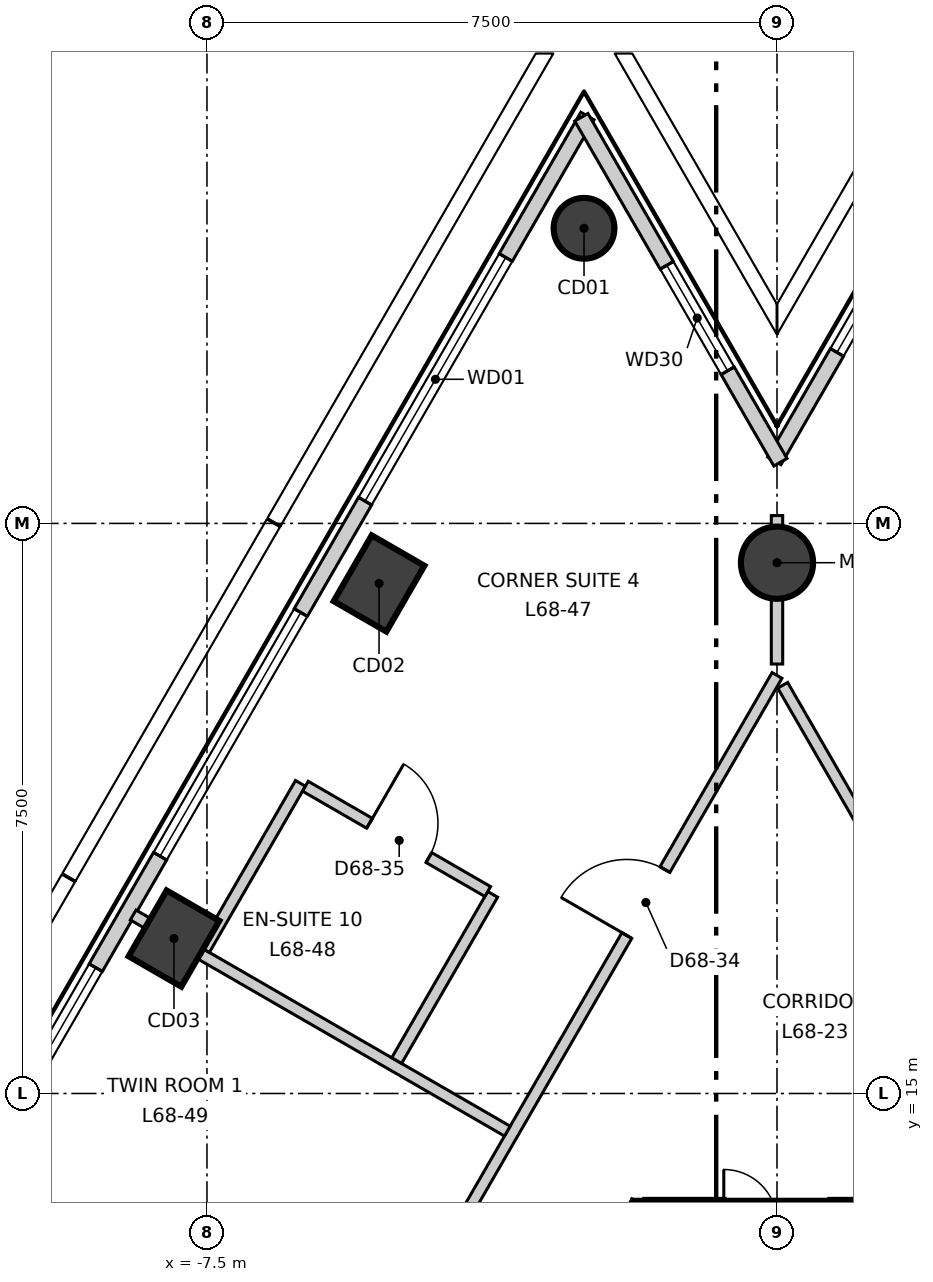
"""IFC4 building model, lengths in metres.
Left out: names, types, materials, properties, quantities, classifications, styles, units other than length and angle.
Written with IfcOpenShell. Run it as: python <this file> out.ifc"""

import sys

from ifc_helpers import new_model, si_unit, direction, frame, frame_2d, origin, origin_2d, place, context, subcontext, project, spatial, polyline, rectangle, circle, outline, extrude, element, fill, save


model = new_model("IFC4")
c1 = context("Model", 3, precision=1e-05, world=origin(), true_north=direction((0.0, 1.0)))
c2 = subcontext(c1, "Body", "Model", "MODEL_VIEW")
j1 = project(units=[si_unit("LENGTHUNIT", "METRE"), si_unit("PLANEANGLEUNIT", "RADIAN")], contexts=[c1])
p1 = place(None, origin())
s1 = spatial("IfcSite", under=j1, at=p1, CompositionType="ELEMENT")
p2 = place(p1, origin())
s2 = spatial("IfcBuilding", under=s1, at=p2, CompositionType="ELEMENT")
p3 = place(p2, frame((0.0, 0.0, 289.9)))
s3 = spatial("IfcBuildingStorey", under=s2, at=p3, CompositionType="ELEMENT", Elevation=289.9)
p4 = place(p3, frame((1.732, 13.3, -0.3), z_axis=(0.0, 0.0, 1.0), x_axis=(-1.0, 0.0, 0.0)))
e1 = element("IfcWall", 1, at=p4, inside=s3, PredefinedType="SHEAR", context=c2, shape_type="SweptSolid", body=[
    extrude(outline(polyline([(-0.173, -0.3), (1.732, -0.3), (3.637, -0.3), (3.291, 0.3), (1.732, 0.3), (0.173, 0.3), (-0.173, -0.3)])), origin(), (0.0, 0.0, 1.0), 3.6),
])
p5 = place(p4, frame((1.032, 0.0, 0.3)))
e2 = element("IfcOpeningElement", 2, at=p5, cuts=e1, PredefinedType="OPENING", context=c2, shape_type="SweptSolid", body=[
    extrude(rectangle(XDim=1.4, YDim=2.1, at=frame_2d((0.7, 1.05))), frame((0.0, 0.31, 0.0), z_axis=(0.0, -1.0, 0.0), x_axis=(1.0, 0.0, 0.0)), (0.0, 0.0, 1.0), 0.62),
])
p6 = place(p3, frame((-1.732, 13.3, -0.3), z_axis=(0.0, 0.0, 1.0), x_axis=(-0.500000539815, -0.866025092122, 0.0)))
e3 = element("IfcWall", 3, at=p6, inside=s3, PredefinedType="SHEAR", context=c2, shape_type="SweptSolid", body=[
    extrude(outline(polyline([(-0.173, -0.3), (1.795, -0.3), (3.763, -0.3), (5.732, -0.3), (7.7, -0.3), (9.668, -0.301), (11.637, -0.301), (13.605, -0.301), (15.573, -0.301), (17.542, -0.301), (19.51, -0.301), (21.478, -0.301), (21.131, 0.3), (19.226, 0.3), (17.321, 0.3), (15.415, 0.3), (13.51, 0.3), (11.605, 0.3), (9.699, 0.3), (7.794, 0.3), (5.889, 0.3), (3.984, 0.3), (2.078, 0.3), (0.173, 0.3), (-0.173, -0.3)])), origin(), (0.0, 0.0, 1.0), 3.6),
])
p7 = place(p6, frame((10.102, 0.0, 0.3)))
e4 = element("IfcOpeningElement", 4, at=p7, cuts=e3, PredefinedType="OPENING", context=c2, shape_type="SweptSolid", body=[
    extrude(rectangle(XDim=1.1, YDim=2.1, at=frame_2d((0.55, 1.05))), frame((0.0, 0.31, 0.0), z_axis=(0.0, -1.0, 0.0), x_axis=(1.0, 0.0, 0.0)), (0.0, 0.0, 1.0), 0.621),
])
p8 = place(p6, frame((16.328, 0.0, 0.3)))
e5 = element("IfcOpeningElement", 5, at=p8, cuts=e3, PredefinedType="OPENING", context=c2, shape_type="SweptSolid", body=[
    extrude(rectangle(XDim=1.0, YDim=2.1, at=frame_2d((0.5, 1.05))), frame((0.0, 0.31, 0.0), z_axis=(0.0, -1.0, 0.0), x_axis=(1.0, 0.0, 0.0)), (0.0, 0.0, 1.0), 0.621),
])
p9 = place(p6, frame((4.777, 0.0, 0.3)))
e6 = element("IfcOpeningElement", 6, at=p9, cuts=e3, PredefinedType="OPENING", context=c2, shape_type="SweptSolid", body=[
    extrude(rectangle(XDim=0.9, YDim=2.1, at=frame_2d((0.45, 1.05))), frame((0.0, 0.31, 0.0), z_axis=(0.0, -1.0, 0.0), x_axis=(1.0, 0.0, 0.0)), (0.0, 0.0, 1.0), 0.621),
])
p10 = place(p3, frame((-2.539, 26.382, -0.3), z_axis=(0.0, 0.0, 1.0), x_axis=(0.5, 0.866025403784, 0.0)))
e7 = element("IfcColumn", 7, at=p10, inside=s3, PredefinedType="COLUMN", context=c2, shape_type="SweptSolid", body=[
    extrude(circle(Radius=0.4, at=origin_2d()), origin(), (0.0, 0.0, 1.0), 3.6),
])
for number, where, z_axis, x_axis in (
    (8, (-5.236, 21.71, -0.3), (0.0, 0.0, 1.0), (0.5, 0.866, 0.0)),
    (9, (-7.934, 17.038, -0.3), (0.0, 0.0, 1.0), (0.5, 0.866, 0.0)),
):
    element("IfcColumn", number, at=place(p3, frame(where, z_axis=z_axis, x_axis=x_axis)), inside=s3, PredefinedType="COLUMN", context=c2, shape_type="SweptSolid", body=[
        extrude(rectangle(XDim=1.0, YDim=0.8, at=origin_2d()), origin(), (0.0, 0.0, 1.0), 3.6),
    ])
p11 = place(p3, frame((0.0, 21.983, -0.3), z_axis=(0.0, 0.0, 1.0), x_axis=(1.0, 0.0, 0.0)))
e10 = element("IfcColumn", 10, at=p11, inside=s3, PredefinedType="COLUMN", context=c2, shape_type="SweptSolid", body=[
    extrude(circle(Radius=0.475, at=origin_2d()), origin(), (0.0, 0.0, 1.0), 3.6),
])
p12 = place(p3, frame((-2.494, 27.86, 0.0), z_axis=(0.0, 0.0, 1.0), x_axis=(-0.500008134474, -0.866020707292, 0.0)))
e11 = element("IfcWall", 11, at=p12, inside=s3, PredefinedType="ELEMENTEDWALL", context=c2, shape_type="SweptSolid", body=[
    extrude(rectangle(XDim=45.741, YDim=0.2, at=frame_2d((22.871, 0.0))), origin(), (0.0, 0.0, 1.0), 3.3),
])
p13 = place(p12, frame((2.15, 0.0, 0.9)))
e12 = element("IfcOpeningElement", 12, at=p13, cuts=e11, PredefinedType="OPENING", context=c2, shape_type="SweptSolid", body=[
    extrude(rectangle(XDim=3.7, YDim=2.2, at=frame_2d((1.85, 1.1))), frame((0.0, 0.11, 0.0), z_axis=(0.0, -1.0, 0.0), x_axis=(1.0, 0.0, 0.0)), (0.0, 0.0, 1.0), 0.22),
])
p14 = place(p12, frame((7.544, 0.0, 0.9)))
e13 = element("IfcOpeningElement", 13, at=p14, cuts=e11, PredefinedType="OPENING", context=c2, shape_type="SweptSolid", body=[
    extrude(rectangle(XDim=3.7, YDim=2.2, at=frame_2d((1.85, 1.1))), frame((0.0, 0.11, 0.0), z_axis=(0.0, -1.0, 0.0), x_axis=(1.0, 0.0, 0.0)), (0.0, 0.0, 1.0), 0.22),
])
p15 = place(p12, frame((12.939, 0.0, 0.9)))
e14 = element("IfcOpeningElement", 14, at=p15, cuts=e11, PredefinedType="OPENING", context=c2, shape_type="SweptSolid", body=[
    extrude(rectangle(XDim=3.7, YDim=2.2, at=frame_2d((1.85, 1.1))), frame((0.0, 0.11, 0.0), z_axis=(0.0, -1.0, 0.0), x_axis=(1.0, 0.0, 0.0)), (0.0, 0.0, 1.0), 0.22),
])
p16 = place(p12, frame((18.333, 0.0, 0.9)))
e15 = element("IfcOpeningElement", 15, at=p16, cuts=e11, PredefinedType="OPENING", context=c2, shape_type="SweptSolid", body=[
    extrude(rectangle(XDim=3.7, YDim=2.2, at=frame_2d((1.85, 1.1))), frame((0.0, 0.11, 0.0), z_axis=(0.0, -1.0, 0.0), x_axis=(1.0, 0.0, 0.0)), (0.0, 0.0, 1.0), 0.22),
])
p17 = place(p12, frame((23.728, 0.0, 0.9)))
e16 = element("IfcOpeningElement", 16, at=p17, cuts=e11, PredefinedType="OPENING", context=c2, shape_type="SweptSolid", body=[
    extrude(rectangle(XDim=3.7, YDim=2.2, at=frame_2d((1.85, 1.1))), frame((0.0, 0.11, 0.0), z_axis=(0.0, -1.0, 0.0), x_axis=(1.0, 0.0, 0.0)), (0.0, 0.0, 1.0), 0.22),
])
p18 = place(p12, frame((29.122, 0.0, 0.9)))
e17 = element("IfcOpeningElement", 17, at=p18, cuts=e11, PredefinedType="OPENING", context=c2, shape_type="SweptSolid", body=[
    extrude(rectangle(XDim=3.7, YDim=2.2, at=frame_2d((1.85, 1.1))), frame((0.0, 0.11, 0.0), z_axis=(0.0, -1.0, 0.0), x_axis=(1.0, 0.0, 0.0)), (0.0, 0.0, 1.0), 0.22),
])
p19 = place(p12, frame((34.517, 0.0, 0.9)))
e18 = element("IfcOpeningElement", 18, at=p19, cuts=e11, PredefinedType="OPENING", context=c2, shape_type="SweptSolid", body=[
    extrude(rectangle(XDim=3.7, YDim=2.2, at=frame_2d((1.85, 1.1))), frame((0.0, 0.11, 0.0), z_axis=(0.0, -1.0, 0.0), x_axis=(1.0, 0.0, 0.0)), (0.0, 0.0, 1.0), 0.22),
])
p20 = place(p12, frame((39.911, 0.0, 0.9)))
e19 = element("IfcOpeningElement", 19, at=p20, cuts=e11, PredefinedType="OPENING", context=c2, shape_type="SweptSolid", body=[
    extrude(rectangle(XDim=3.7, YDim=2.2, at=frame_2d((1.85, 1.1))), frame((0.0, 0.11, 0.0), z_axis=(0.0, -1.0, 0.0), x_axis=(1.0, 0.0, 0.0)), (0.0, 0.0, 1.0), 0.22),
])
p21 = place(p3, frame((2.584, 27.86, 0.0), z_axis=(0.0, 0.0, 1.0), x_axis=(-0.499832707108, -0.866121968839, 0.0)))
e20 = element("IfcWall", 20, at=p21, inside=s3, PredefinedType="ELEMENTEDWALL", context=c2, shape_type="SweptSolid", body=[
    extrude(rectangle(XDim=5.24, YDim=0.2, at=frame_2d((2.62, 0.0))), origin(), (0.0, 0.0, 1.0), 3.3),
])
p22 = place(p21, frame((1.99, 0.0, 0.9)))
e21 = element("IfcOpeningElement", 21, at=p22, cuts=e20, PredefinedType="OPENING", context=c2, shape_type="SweptSolid", body=[
    extrude(rectangle(XDim=1.6, YDim=2.2, at=frame_2d((0.8, 1.1))), frame((0.0, 0.11, 0.0), z_axis=(0.0, -1.0, 0.0), x_axis=(1.0, 0.0, 0.0)), (0.0, 0.0, 1.0), 0.22),
])
p23 = place(p3, frame((0.045, 23.305, 0.0), z_axis=(0.0, 0.0, 1.0), x_axis=(-0.499832707108, 0.866121968839, 0.0)))
e22 = element("IfcWall", 22, at=p23, inside=s3, PredefinedType="ELEMENTEDWALL", context=c2, shape_type="SweptSolid", body=[
    extrude(rectangle(XDim=5.24, YDim=0.2, at=frame_2d((2.62, 0.0))), origin(), (0.0, 0.0, 1.0), 3.3),
])
p24 = place(p23, frame((1.39, 0.0, 0.9)))
e23 = element("IfcOpeningElement", 23, at=p24, cuts=e22, PredefinedType="OPENING", context=c2, shape_type="SweptSolid", body=[
    extrude(rectangle(XDim=1.6, YDim=2.2, at=frame_2d((0.8, 1.1))), frame((0.0, 0.11, 0.0), z_axis=(0.0, -1.0, 0.0), x_axis=(1.0, 0.0, 0.0)), (0.0, 0.0, 1.0), 0.22),
])
p25 = place(p3, frame((-17.679, -10.12, 0.0), z_axis=(0.0, 0.0, 1.0), x_axis=(0.500008955215, 0.866020233427, 0.0)))
e24 = element("IfcWall", 24, at=p25, inside=s3, PredefinedType="PARTITIONING", context=c2, shape_type="SweptSolid", body=[
    extrude(rectangle(XDim=35.357, YDim=0.15, at=frame_2d((17.679, 0.0))), origin(), (0.0, 0.0, 1.0), 3.3),
])
p26 = place(p25, frame((31.407, 0.0, 0.0)))
e25 = element("IfcOpeningElement", 25, at=p26, cuts=e24, PredefinedType="OPENING", context=c2, shape_type="SweptSolid", body=[
    extrude(rectangle(XDim=1.0, YDim=2.1, at=frame_2d((0.5, 1.05))), frame((0.0, 0.085, 0.0), z_axis=(0.0, -1.0, 0.0), x_axis=(1.0, 0.0, 0.0)), (0.0, 0.0, 1.0), 0.17),
])
p27 = place(p25, frame((25.642, 0.0, 0.0)))
e26 = element("IfcOpeningElement", 26, at=p27, cuts=e24, PredefinedType="OPENING", context=c2, shape_type="SweptSolid", body=[
    extrude(rectangle(XDim=1.0, YDim=2.1, at=frame_2d((0.5, 1.05))), frame((0.0, 0.085, 0.0), z_axis=(0.0, -1.0, 0.0), x_axis=(1.0, 0.0, 0.0)), (0.0, 0.0, 1.0), 0.17),
])
p28 = place(p25, frame((18.348, 0.0, 0.0)))
e27 = element("IfcOpeningElement", 27, at=p28, cuts=e24, PredefinedType="OPENING", context=c2, shape_type="SweptSolid", body=[
    extrude(rectangle(XDim=1.0, YDim=2.1, at=frame_2d((0.5, 1.05))), frame((0.0, 0.085, 0.0), z_axis=(0.0, -1.0, 0.0), x_axis=(1.0, 0.0, 0.0)), (0.0, 0.0, 1.0), 0.17),
])
p29 = place(p25, frame((13.254, 0.0, 0.0)))
e28 = element("IfcOpeningElement", 28, at=p29, cuts=e24, PredefinedType="OPENING", context=c2, shape_type="SweptSolid", body=[
    extrude(rectangle(XDim=1.0, YDim=2.1, at=frame_2d((0.5, 1.05))), frame((0.0, 0.085, 0.0), z_axis=(0.0, -1.0, 0.0), x_axis=(1.0, 0.0, 0.0)), (0.0, 0.0, 1.0), 0.17),
])
p30 = place(p25, frame((7.559, 0.0, 0.0)))
e29 = element("IfcOpeningElement", 29, at=p30, cuts=e24, PredefinedType="OPENING", context=c2, shape_type="SweptSolid", body=[
    extrude(rectangle(XDim=1.0, YDim=2.1, at=frame_2d((0.5, 1.05))), frame((0.0, 0.085, 0.0), z_axis=(0.0, -1.0, 0.0), x_axis=(1.0, 0.0, 0.0)), (0.0, 0.0, 1.0), 0.17),
])
p31 = place(p25, frame((2.865, 0.0, 0.0)))
e30 = element("IfcOpeningElement", 30, at=p31, cuts=e24, PredefinedType="OPENING", context=c2, shape_type="SweptSolid", body=[
    extrude(rectangle(XDim=1.0, YDim=2.1, at=frame_2d((0.5, 1.05))), frame((0.0, 0.085, 0.0), z_axis=(0.0, -1.0, 0.0), x_axis=(1.0, 0.0, 0.0)), (0.0, 0.0, 1.0), 0.17),
])
p32 = place(p3, frame((-8.471, 17.348, 0.0), z_axis=(0.0, 0.0, 1.0), x_axis=(0.86596385927, -0.500106583079, 0.0)))
e31 = element("IfcWall", 31, at=p32, inside=s3, PredefinedType="PARTITIONING", context=c2, shape_type="SweptSolid", body=[
    extrude(rectangle(XDim=5.685, YDim=0.15, at=frame_2d((2.842, 0.0))), origin(), (0.0, 0.0, 1.0), 3.3),
])
p33 = place(p3, frame((0.0, 20.65, 0.0), z_axis=(0.0, 0.0, 1.0), x_axis=(0.0, 1.0, 0.0)))
e32 = element("IfcWall", 32, at=p33, inside=s3, PredefinedType="PARTITIONING", context=c2, shape_type="SweptSolid", body=[
    extrude(rectangle(XDim=1.953, YDim=0.15, at=frame_2d((0.977, 0.0))), origin(), (0.0, 0.0, 1.0), 2.8),
])
p34 = place(p3, frame((0.075, 20.37, 0.0), z_axis=(0.0, 0.0, 1.0), x_axis=(0.500009775255, -0.866019759965, 0.0)))
e33 = element("IfcWall", 33, at=p34, inside=s3, PredefinedType="PARTITIONING", context=c2, shape_type="SweptSolid", body=[
    extrude(rectangle(XDim=35.207, YDim=0.15, at=frame_2d((17.604, 0.0))), origin(), (0.0, 0.0, 1.0), 3.3),
])
p35 = place(p34, frame((31.407, 0.0, 0.0)))
e34 = element("IfcOpeningElement", 34, at=p35, cuts=e33, PredefinedType="OPENING", context=c2, shape_type="SweptSolid", body=[
    extrude(rectangle(XDim=1.0, YDim=2.1, at=frame_2d((0.5, 1.05))), frame((0.0, 0.085, 0.0), z_axis=(0.0, -1.0, 0.0), x_axis=(1.0, 0.0, 0.0)), (0.0, 0.0, 1.0), 0.17),
])
p36 = place(p34, frame((19.243, 0.0, 0.0)))
e35 = element("IfcOpeningElement", 35, at=p36, cuts=e33, PredefinedType="OPENING", context=c2, shape_type="SweptSolid", body=[
    extrude(rectangle(XDim=1.0, YDim=2.1, at=frame_2d((0.5, 1.05))), frame((0.0, 0.085, 0.0), z_axis=(0.0, -1.0, 0.0), x_axis=(1.0, 0.0, 0.0)), (0.0, 0.0, 1.0), 0.17),
])
p37 = place(p34, frame((24.543, 0.0, 0.0)))
e36 = element("IfcOpeningElement", 36, at=p37, cuts=e33, PredefinedType="OPENING", context=c2, shape_type="SweptSolid", body=[
    extrude(rectangle(XDim=0.9, YDim=2.1, at=frame_2d((0.45, 1.05))), frame((0.0, 0.085, 0.0), z_axis=(0.0, -1.0, 0.0), x_axis=(1.0, 0.0, 0.0)), (0.0, 0.0, 1.0), 0.17),
])
p38 = place(p34, frame((22.443, 0.0, 0.0)))
e37 = element("IfcOpeningElement", 37, at=p38, cuts=e33, PredefinedType="OPENING", context=c2, shape_type="SweptSolid", body=[
    extrude(rectangle(XDim=0.9, YDim=2.1, at=frame_2d((0.45, 1.05))), frame((0.0, 0.085, 0.0), z_axis=(0.0, -1.0, 0.0), x_axis=(1.0, 0.0, 0.0)), (0.0, 0.0, 1.0), 0.17),
])
p39 = place(p34, frame((13.253, 0.0, 0.0)))
e38 = element("IfcOpeningElement", 38, at=p39, cuts=e33, PredefinedType="OPENING", context=c2, shape_type="SweptSolid", body=[
    extrude(rectangle(XDim=1.0, YDim=2.1, at=frame_2d((0.5, 1.05))), frame((0.0, 0.085, 0.0), z_axis=(0.0, -1.0, 0.0), x_axis=(1.0, 0.0, 0.0)), (0.0, 0.0, 1.0), 0.17),
])
p40 = place(p34, frame((5.559, 0.0, 0.0)))
e39 = element("IfcOpeningElement", 39, at=p40, cuts=e33, PredefinedType="OPENING", context=c2, shape_type="SweptSolid", body=[
    extrude(rectangle(XDim=1.0, YDim=2.1, at=frame_2d((0.5, 1.05))), frame((0.0, 0.085, 0.0), z_axis=(0.0, -1.0, 0.0), x_axis=(1.0, 0.0, 0.0)), (0.0, 0.0, 1.0), 0.17),
])
p41 = place(p3, frame((-5.004, 15.433, 0.0), z_axis=(0.0, 0.0, 1.0), x_axis=(0.500079482444, 0.865979509711, 0.0)))
e40 = element("IfcWall", 40, at=p41, inside=s3, PredefinedType="PARTITIONING", context=c2, shape_type="SweptSolid", body=[
    extrude(rectangle(XDim=2.525, YDim=0.15, at=frame_2d((1.263, 0.0))), origin(), (0.0, 0.0, 1.0), 3.3),
])
p42 = place(p3, frame((-7.533, 16.893, 0.0), z_axis=(0.0, 0.0, 1.0), x_axis=(0.500079482444, 0.865979509711, 0.0)))
e41 = element("IfcWall", 41, at=p42, inside=s3, PredefinedType="PARTITIONING", context=c2, shape_type="SweptSolid", body=[
    extrude(rectangle(XDim=2.525, YDim=0.15, at=frame_2d((1.263, 0.0))), origin(), (0.0, 0.0, 1.0), 2.6),
])
p43 = place(p3, frame((-6.205, 19.042, 0.0), z_axis=(0.0, 0.0, 1.0), x_axis=(0.866049104564, -0.499958946799, 0.0)))
e42 = element("IfcWall", 42, at=p43, inside=s3, PredefinedType="PARTITIONING", context=c2, shape_type="SweptSolid", body=[
    extrude(rectangle(XDim=2.77, YDim=0.15, at=frame_2d((1.385, 0.0))), origin(), (0.0, 0.0, 1.0), 3.3),
])
p44 = place(p43, frame((0.975, 0.0, 0.0)))
e43 = element("IfcOpeningElement", 43, at=p44, cuts=e42, PredefinedType="OPENING", context=c2, shape_type="SweptSolid", body=[
    extrude(rectangle(XDim=0.9, YDim=2.1, at=frame_2d((0.45, 1.05))), frame((0.0, 0.085, 0.0), z_axis=(0.0, -1.0, 0.0), x_axis=(1.0, 0.0, 0.0)), (0.0, 0.0, 1.0), 0.17),
])
p45 = place(p13, origin())
e44 = element("IfcWindow", 44, at=p45, inside=s3, PartitioningType="SINGLE_PANEL", PredefinedType="WINDOW", context=c2, shape_type="SweptSolid", body=[
    extrude(rectangle(XDim=3.7, YDim=2.2, at=frame_2d((1.85, 1.1))), frame((0.0, 0.03, 0.0), z_axis=(0.0, -1.0, 0.0), x_axis=(1.0, 0.0, 0.0)), (0.0, 0.0, 1.0), 0.06),
])
fill(e12, e44)
p46 = place(p14, origin())
e45 = element("IfcWindow", 45, at=p46, inside=s3, PartitioningType="SINGLE_PANEL", PredefinedType="WINDOW", context=c2, shape_type="SweptSolid", body=[
    extrude(rectangle(XDim=3.7, YDim=2.2, at=frame_2d((1.85, 1.1))), frame((0.0, 0.03, 0.0), z_axis=(0.0, -1.0, 0.0), x_axis=(1.0, 0.0, 0.0)), (0.0, 0.0, 1.0), 0.06),
])
fill(e13, e45)
p47 = place(p15, origin())
e46 = element("IfcWindow", 46, at=p47, inside=s3, PartitioningType="SINGLE_PANEL", PredefinedType="WINDOW", context=c2, shape_type="SweptSolid", body=[
    extrude(rectangle(XDim=3.7, YDim=2.2, at=frame_2d((1.85, 1.1))), frame((0.0, 0.03, 0.0), z_axis=(0.0, -1.0, 0.0), x_axis=(1.0, 0.0, 0.0)), (0.0, 0.0, 1.0), 0.06),
])
fill(e14, e46)
p48 = place(p22, origin())
e47 = element("IfcWindow", 47, at=p48, inside=s3, PartitioningType="SINGLE_PANEL", PredefinedType="WINDOW", context=c2, shape_type="SweptSolid", body=[
    extrude(rectangle(XDim=1.6, YDim=2.2, at=frame_2d((0.8, 1.1))), frame((0.0, 0.03, 0.0), z_axis=(0.0, -1.0, 0.0), x_axis=(1.0, 0.0, 0.0)), (0.0, 0.0, 1.0), 0.06),
])
fill(e21, e47)
p49 = place(p24, origin())
e48 = element("IfcWindow", 48, at=p49, inside=s3, PartitioningType="SINGLE_PANEL", PredefinedType="WINDOW", context=c2, shape_type="SweptSolid", body=[
    extrude(rectangle(XDim=1.6, YDim=2.2, at=frame_2d((0.8, 1.1))), frame((0.0, 0.03, 0.0), z_axis=(0.0, -1.0, 0.0), x_axis=(1.0, 0.0, 0.0)), (0.0, 0.0, 1.0), 0.06),
])
fill(e23, e48)
p50 = place(p26, origin())
e49 = element("IfcDoor", 49, at=p50, inside=s3, OperationType="SINGLE_SWING_RIGHT", PredefinedType="DOOR", context=c2, shape_type="SweptSolid", body=[
    extrude(rectangle(XDim=1.0, YDim=2.1, at=frame_2d((0.5, 1.05))), frame((0.0, 0.025, 0.0), z_axis=(0.0, -1.0, 0.0), x_axis=(1.0, 0.0, 0.0)), (0.0, 0.0, 1.0), 0.05),
])
fill(e25, e49)
p51 = place(p44, origin())
e50 = element("IfcDoor", 50, at=p51, inside=s3, OperationType="SINGLE_SWING_RIGHT", PredefinedType="DOOR", context=c2, shape_type="SweptSolid", body=[
    extrude(rectangle(XDim=0.9, YDim=2.1, at=frame_2d((0.45, 1.05))), frame((0.0, 0.025, 0.0), z_axis=(0.0, -1.0, 0.0), x_axis=(1.0, 0.0, 0.0)), (0.0, 0.0, 1.0), 0.05),
])
fill(e43, e50)
save(model, sys.argv[1])
